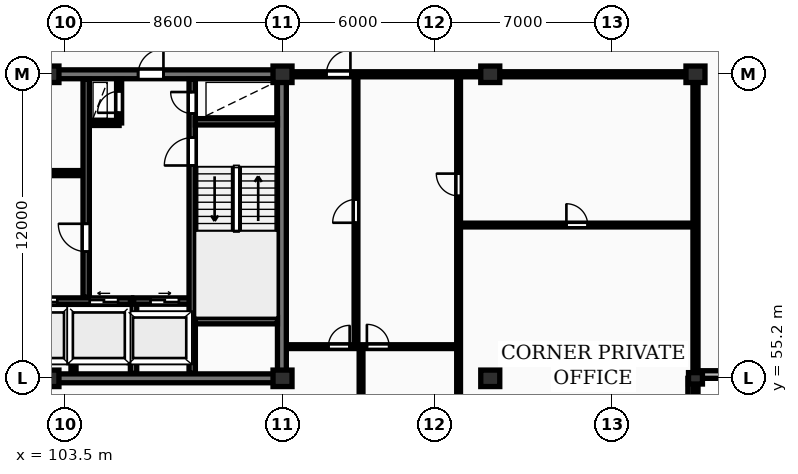
"""IFC4 building model, lengths in metres.
Left out: names, types, materials, properties, quantities, classifications, styles, units other than length and angle.
Written with IfcOpenShell. Run it as: python <this file> out.ifc"""

import sys

from ifc_helpers import new_model, si_unit, direction, frame, frame_2d, origin, origin_2d, place, context, subcontext, project, spatial, rectangle, extrude, element, fill, save


model = new_model("IFC4")
c1 = context("Model", 3, precision=1e-05, world=origin(), true_north=direction((0.0, 1.0)))
c2 = subcontext(c1, "Body", "Model", "MODEL_VIEW")
j1 = project(units=[si_unit("LENGTHUNIT", "METRE"), si_unit("PLANEANGLEUNIT", "RADIAN")], contexts=[c1])
p1 = place(None, origin())
s1 = spatial("IfcSite", under=j1, at=p1, CompositionType="ELEMENT")
p2 = place(p1, origin())
s2 = spatial("IfcBuilding", under=s1, at=p2, CompositionType="ELEMENT")
p3 = place(p2, frame((0.0, 0.0, 228.65)))
s3 = spatial("IfcBuildingStorey", under=s2, at=p3, CompositionType="ELEMENT", Elevation=228.65)
for number, where, z_axis, x_axis in (
    (1, (102.9, 55.2, 0.0), (0.0, 0.0, 1.0), (1.0, 0.0, 0.0)),
    (2, (102.9, 67.2, 0.0), (0.0, 0.0, 1.0), (1.0, 0.0, 0.0)),
    (3, (112.1, 55.2, 0.0), (0.0, 0.0, 1.0), (1.0, 0.0, 0.0)),
    (4, (112.1, 67.2, 0.0), (0.0, 0.0, 1.0), (1.0, 0.0, 0.0)),
    (5, (120.3, 55.2, 0.0), (0.0, 0.0, 1.0), (1.0, 0.0, 0.0)),
    (6, (120.3, 67.2, 0.0), (0.0, 0.0, 1.0), (1.0, 0.0, 0.0)),
):
    element("IfcColumn", number, at=place(p3, frame(where, z_axis=z_axis, x_axis=x_axis)), inside=s3, PredefinedType="COLUMN", context=c2, shape_type="SweptSolid", body=[
        extrude(rectangle(XDim=0.75, YDim=0.65, at=origin_2d()), origin(), (0.0, 0.0, 1.0), 3.45),
    ])
p4 = place(p3, frame((128.4, 55.2, 0.0), z_axis=(0.0, 0.0, 1.0), x_axis=(1.0, 0.0, 0.0)))
e7 = element("IfcColumn", 7, at=p4, inside=s3, PredefinedType="PILASTER", context=c2, shape_type="SweptSolid", body=[
    extrude(rectangle(XDim=0.55, YDim=0.45, at=origin_2d()), origin(), (0.0, 0.0, 1.0), 3.45),
])
p5 = place(p3, frame((128.4, 67.2, 0.0), z_axis=(0.0, 0.0, 1.0), x_axis=(1.0, 0.0, 0.0)))
e8 = element("IfcColumn", 8, at=p5, inside=s3, PredefinedType="COLUMN", context=c2, shape_type="SweptSolid", body=[
    extrude(rectangle(XDim=0.75, YDim=0.65, at=origin_2d()), origin(), (0.0, 0.0, 1.0), 3.45),
])
p6 = place(p3, frame((128.25, 51.6, 0.0), z_axis=(0.0, 0.0, 1.0), x_axis=(0.0, 1.0, 0.0)))
e9 = element("IfcWall", 9, at=p6, inside=s3, PredefinedType="STANDARD", context=c2, shape_type="SweptSolid", body=[
    extrude(rectangle(XDim=3.6, YDim=0.3, at=frame_2d((1.8, 0.0))), origin(), (0.0, 0.0, 1.0), 3.17),
])
p7 = place(p3, frame((128.4, 55.35, 0.0), z_axis=(0.0, 0.0, 1.0), x_axis=(1.0, 0.0, 0.0)))
e10 = element("IfcWall", 10, at=p7, inside=s3, PredefinedType="STANDARD", context=c2, shape_type="SweptSolid", body=[
    extrude(rectangle(XDim=3.6, YDim=0.3, at=frame_2d((1.8, 0.0))), origin(), (0.0, 0.0, 1.0), 3.17),
])
p8 = place(p3, frame((75.95, 55.2, 0.0), z_axis=(0.0, 0.0, 1.0), x_axis=(1.0, 0.0, 0.0)))
e11 = element("IfcWall", 11, at=p8, inside=s3, PredefinedType="SHEAR", context=c2, shape_type="SweptSolid", body=[
    extrude(rectangle(XDim=36.3, YDim=0.35, at=frame_2d((18.15, 0.0))), origin(), (0.0, 0.0, 1.0), 3.45),
])
p9 = place(p3, frame((112.075, 55.375, 0.0), z_axis=(0.0, 0.0, 1.0), x_axis=(0.0, 1.0, 0.0)))
e12 = element("IfcWall", 12, at=p9, inside=s3, PredefinedType="SHEAR", context=c2, shape_type="SweptSolid", body=[
    extrude(rectangle(XDim=11.65, YDim=0.35, at=frame_2d((5.825, 0.0))), origin(), (0.0, 0.0, 1.0), 3.45),
])
p10 = place(p3, frame((75.95, 67.2, 0.0), z_axis=(0.0, 0.0, 1.0), x_axis=(1.0, 0.0, 0.0)))
e13 = element("IfcWall", 13, at=p10, inside=s3, PredefinedType="SHEAR", context=c2, shape_type="SweptSolid", body=[
    extrude(rectangle(XDim=36.3, YDim=0.35, at=frame_2d((18.15, 0.0))), origin(), (0.0, 0.0, 1.0), 3.45),
])
p11 = place(p10, frame((5.25, 0.0, 0.0)))
e14 = element("IfcOpeningElement", 14, at=p11, cuts=e13, PredefinedType="OPENING", context=c2, shape_type="SweptSolid", body=[
    extrude(rectangle(XDim=1.0, YDim=2.15, at=frame_2d((0.5, 1.075))), frame((0.0, 0.185, 0.0), z_axis=(0.0, -1.0, 0.0), x_axis=(1.0, 0.0, 0.0)), (0.0, 0.0, 1.0), 0.37),
])
p12 = place(p10, frame((21.6, 0.0, 0.0)))
e15 = element("IfcOpeningElement", 15, at=p12, cuts=e13, PredefinedType="OPENING", context=c2, shape_type="SweptSolid", body=[
    extrude(rectangle(XDim=1.5, YDim=2.2, at=frame_2d((0.75, 1.1))), frame((0.0, 0.185, 0.0), z_axis=(0.0, -1.0, 0.0), x_axis=(1.0, 0.0, 0.0)), (0.0, 0.0, 1.0), 0.37),
])
p13 = place(p10, frame((30.45, 0.0, 0.0)))
e16 = element("IfcOpeningElement", 16, at=p13, cuts=e13, PredefinedType="OPENING", context=c2, shape_type="SweptSolid", body=[
    extrude(rectangle(XDim=1.0, YDim=2.15, at=frame_2d((0.5, 1.075))), frame((0.0, 0.185, 0.0), z_axis=(0.0, -1.0, 0.0), x_axis=(1.0, 0.0, 0.0)), (0.0, 0.0, 1.0), 0.37),
])
p14 = place(p3, frame((103.85, 55.4, 0.0), z_axis=(0.0, 0.0, 1.0), x_axis=(0.0, 1.0, 0.0)))
e17 = element("IfcWall", 17, at=p14, inside=s3, PredefinedType="PARTITIONING", context=c2, shape_type="SweptSolid", body=[
    extrude(rectangle(XDim=2.72, YDim=0.2, at=frame_2d((1.36, 0.0))), origin(), (0.0, 0.0, 1.0), 3.17),
])
p15 = place(p3, frame((101.55, 58.25, 0.0), z_axis=(0.0, 0.0, 1.0), x_axis=(1.0, 0.0, 0.0)))
e18 = element("IfcWall", 18, at=p15, inside=s3, PredefinedType="SHEAR", context=c2, shape_type="SweptSolid", body=[
    extrude(rectangle(XDim=4.6, YDim=0.25, at=frame_2d((2.3, 0.0))), origin(), (0.0, 0.0, 1.0), 3.45),
])
p16 = place(p15, frame((0.54, 0.0, 0.0)))
e19 = element("IfcOpeningElement", 19, at=p16, cuts=e18, PredefinedType="OPENING", context=c2, shape_type="SweptSolid", body=[
    extrude(rectangle(XDim=1.12, YDim=2.12, at=frame_2d((0.56, 1.06))), frame((0.0, 0.135, 0.0), z_axis=(0.0, -1.0, 0.0), x_axis=(1.0, 0.0, 0.0)), (0.0, 0.0, 1.0), 0.27),
])
p17 = place(p15, frame((2.94, 0.0, 0.0)))
e20 = element("IfcOpeningElement", 20, at=p17, cuts=e18, PredefinedType="OPENING", context=c2, shape_type="SweptSolid", body=[
    extrude(rectangle(XDim=1.12, YDim=2.12, at=frame_2d((0.56, 1.06))), frame((0.0, 0.135, 0.0), z_axis=(0.0, -1.0, 0.0), x_axis=(1.0, 0.0, 0.0)), (0.0, 0.0, 1.0), 0.27),
])
p18 = place(p3, frame((106.22, 55.4, 0.0), z_axis=(0.0, 0.0, 1.0), x_axis=(0.0, 1.0, 0.0)))
e21 = element("IfcWall", 21, at=p18, inside=s3, PredefinedType="SHEAR", context=c2, shape_type="SweptSolid", body=[
    extrude(rectangle(XDim=2.85, YDim=0.25, at=frame_2d((1.425, 0.0))), origin(), (0.0, 0.0, 1.0), 3.45),
])
p19 = place(p3, frame((106.22, 58.25, 0.0), z_axis=(0.0, 0.0, 1.0), x_axis=(1.0, 0.0, 0.0)))
e22 = element("IfcWall", 22, at=p19, inside=s3, PredefinedType="SHEAR", context=c2, shape_type="SweptSolid", body=[
    extrude(rectangle(XDim=2.46, YDim=0.25, at=frame_2d((1.23, 0.0))), origin(), (0.0, 0.0, 1.0), 3.45),
])
p20 = place(p19, frame((0.67, 0.0, 0.0)))
e23 = element("IfcOpeningElement", 23, at=p20, cuts=e22, PredefinedType="OPENING", context=c2, shape_type="SweptSolid", body=[
    extrude(rectangle(XDim=1.12, YDim=2.12, at=frame_2d((0.56, 1.06))), frame((0.0, 0.135, 0.0), z_axis=(0.0, -1.0, 0.0), x_axis=(1.0, 0.0, 0.0)), (0.0, 0.0, 1.0), 0.27),
])
p21 = place(p3, frame((84.42, 63.3, 0.0), z_axis=(0.0, 0.0, 1.0), x_axis=(1.0, 0.0, 0.0)))
e24 = element("IfcWall", 24, at=p21, inside=s3, PredefinedType="PARTITIONING", context=c2, shape_type="SweptSolid", body=[
    extrude(rectangle(XDim=19.83, YDim=0.2, at=frame_2d((9.915, 0.0))), origin(), (0.0, 0.0, 1.0), 3.17),
])
p22 = place(p21, frame((1.15, 0.0, 0.0)))
e25 = element("IfcOpeningElement", 25, at=p22, cuts=e24, PredefinedType="OPENING", context=c2, shape_type="SweptSolid", body=[
    extrude(rectangle(XDim=0.85, YDim=2.05, at=frame_2d((0.425, 1.025))), frame((0.0, 0.11, 0.0), z_axis=(0.0, -1.0, 0.0), x_axis=(1.0, 0.0, 0.0)), (0.0, 0.0, 1.0), 0.22),
])
p23 = place(p21, frame((3.25, 0.0, 0.0)))
e26 = element("IfcOpeningElement", 26, at=p23, cuts=e24, PredefinedType="OPENING", context=c2, shape_type="SweptSolid", body=[
    extrude(rectangle(XDim=0.85, YDim=2.05, at=frame_2d((0.425, 1.025))), frame((0.0, 0.11, 0.0), z_axis=(0.0, -1.0, 0.0), x_axis=(1.0, 0.0, 0.0)), (0.0, 0.0, 1.0), 0.22),
])
p24 = place(p21, frame((13.08, 0.0, 0.0)))
e27 = element("IfcOpeningElement", 27, at=p24, cuts=e24, PredefinedType="OPENING", context=c2, shape_type="SweptSolid", body=[
    extrude(rectangle(XDim=1.5, YDim=2.2, at=frame_2d((0.75, 1.1))), frame((0.0, 0.11, 0.0), z_axis=(0.0, -1.0, 0.0), x_axis=(1.0, 0.0, 0.0)), (0.0, 0.0, 1.0), 0.22),
])
p25 = place(p21, frame((6.78, 0.0, 0.0)))
e28 = element("IfcOpeningElement", 28, at=p25, cuts=e24, PredefinedType="OPENING", context=c2, shape_type="SweptSolid", body=[
    extrude(rectangle(XDim=0.92, YDim=2.08, at=frame_2d((0.46, 1.04))), frame((0.0, 0.11, 0.0), z_axis=(0.0, -1.0, 0.0), x_axis=(1.0, 0.0, 0.0)), (0.0, 0.0, 1.0), 0.22),
])
p26 = place(p21, frame((16.28, 0.0, 0.0)))
e29 = element("IfcOpeningElement", 29, at=p26, cuts=e24, PredefinedType="OPENING", context=c2, shape_type="SweptSolid", body=[
    extrude(rectangle(XDim=0.92, YDim=2.08, at=frame_2d((0.46, 1.04))), frame((0.0, 0.11, 0.0), z_axis=(0.0, -1.0, 0.0), x_axis=(1.0, 0.0, 0.0)), (0.0, 0.0, 1.0), 0.22),
])
p27 = place(p3, frame((104.45, 65.28, 0.0), z_axis=(0.0, 0.0, 1.0), x_axis=(1.0, 0.0, 0.0)))
e30 = element("IfcWall", 30, at=p27, inside=s3, PredefinedType="PARTITIONING", context=c2, shape_type="SweptSolid", body=[
    extrude(rectangle(XDim=1.2, YDim=0.2, at=frame_2d((0.6, 0.0))), origin(), (0.0, 0.0, 1.0), 3.17),
])
p28 = place(p3, frame((105.65, 65.28, 0.0), z_axis=(0.0, 0.0, 1.0), x_axis=(0.0, 1.0, 0.0)))
e31 = element("IfcWall", 31, at=p28, inside=s3, PredefinedType="PARTITIONING", context=c2, shape_type="SweptSolid", body=[
    extrude(rectangle(XDim=1.72, YDim=0.2, at=frame_2d((0.86, 0.0))), origin(), (0.0, 0.0, 1.0), 3.17),
])
p29 = place(p28, frame((0.4, 0.0, 0.0)))
e32 = element("IfcOpeningElement", 32, at=p29, cuts=e31, PredefinedType="OPENING", context=c2, shape_type="SweptSolid", body=[
    extrude(rectangle(XDim=0.85, YDim=2.05, at=frame_2d((0.425, 1.025))), frame((0.0, 0.11, 0.0), z_axis=(0.0, -1.0, 0.0), x_axis=(1.0, 0.0, 0.0)), (0.0, 0.0, 1.0), 0.22),
])
p30 = place(p3, frame((104.35, 58.4, 0.0), z_axis=(0.0, 0.0, 1.0), x_axis=(0.0, 1.0, 0.0)))
e33 = element("IfcWall", 33, at=p30, inside=s3, PredefinedType="SHEAR", context=c2, shape_type="SweptSolid", body=[
    extrude(rectangle(XDim=8.6, YDim=0.25, at=frame_2d((4.3, 0.0))), origin(), (0.0, 0.0, 1.0), 3.45),
])
p31 = place(p30, frame((1.8, 0.0, 0.0)))
e34 = element("IfcOpeningElement", 34, at=p31, cuts=e33, PredefinedType="OPENING", context=c2, shape_type="SweptSolid", body=[
    extrude(rectangle(XDim=1.1, YDim=2.1, at=frame_2d((0.55, 1.05))), frame((0.0, 0.135, 0.0), z_axis=(0.0, -1.0, 0.0), x_axis=(1.0, 0.0, 0.0)), (0.0, 0.0, 1.0), 0.27),
])
p32 = place(p3, frame((108.535, 55.4, 0.0), z_axis=(0.0, 0.0, 1.0), x_axis=(0.0, 1.0, 0.0)))
e35 = element("IfcWall", 35, at=p32, inside=s3, PredefinedType="SHEAR", context=c2, shape_type="SweptSolid", body=[
    extrude(rectangle(XDim=11.6, YDim=0.25, at=frame_2d((5.8, 0.0))), origin(), (0.0, 0.0, 1.0), 3.45),
])
p33 = place(p32, frame((8.2, 0.0, 0.0)))
e36 = element("IfcOpeningElement", 36, at=p33, cuts=e35, PredefinedType="OPENING", context=c2, shape_type="SweptSolid", body=[
    extrude(rectangle(XDim=1.1, YDim=2.1, at=frame_2d((0.55, 1.05))), frame((0.0, 0.135, 0.0), z_axis=(0.0, -1.0, 0.0), x_axis=(1.0, 0.0, 0.0)), (0.0, 0.0, 1.0), 0.27),
])
p34 = place(p32, frame((10.25, 0.0, 0.0)))
e37 = element("IfcOpeningElement", 37, at=p34, cuts=e35, PredefinedType="OPENING", context=c2, shape_type="SweptSolid", body=[
    extrude(rectangle(XDim=0.85, YDim=2.05, at=frame_2d((0.425, 1.025))), frame((0.0, 0.135, 0.0), z_axis=(0.0, -1.0, 0.0), x_axis=(1.0, 0.0, 0.0)), (0.0, 0.0, 1.0), 0.27),
])
for number, where, z_axis, x_axis in (
    (38, (108.66, 57.475, 0.0), (0.0, 0.0, 1.0), (1.0, 0.0, 0.0)),
    (39, (108.66, 65.325, 0.0), (0.0, 0.0, 1.0), (1.0, 0.0, 0.0)),
):
    element("IfcWall", number, at=place(p3, frame(where, z_axis=z_axis, x_axis=x_axis)), inside=s3, PredefinedType="SHEAR", context=c2, shape_type="SweptSolid", body=[
        extrude(rectangle(XDim=3.24, YDim=0.25, at=frame_2d((1.62, 0.0))), origin(), (0.0, 0.0, 1.0), 3.45),
    ])
p35 = place(p3, frame((128.4, 51.9, 0.0), z_axis=(0.0, 0.0, 1.0), x_axis=(0.0, 1.0, 0.0)))
e40 = element("IfcWall", 40, at=p35, inside=s3, PredefinedType="PARTITIONING", context=c2, shape_type="SweptSolid", body=[
    extrude(rectangle(XDim=15.3, YDim=0.2, at=frame_2d((7.65, 0.0))), origin(), (0.0, 0.0, 1.0), 2.477),
])
p36 = place(p3, frame((119.05, 61.25, 0.0), z_axis=(0.0, 0.0, 1.0), x_axis=(1.0, 0.0, 0.0)))
e41 = element("IfcWall", 41, at=p36, inside=s3, PredefinedType="PARTITIONING", context=c2, shape_type="SweptSolid", body=[
    extrude(rectangle(XDim=9.35, YDim=0.15, at=frame_2d((4.675, 0.0))), origin(), (0.0, 0.0, 1.0), 3.17),
])
p37 = place(p36, frame((4.255, 0.0, 0.0)))
e42 = element("IfcOpeningElement", 42, at=p37, cuts=e41, PredefinedType="OPENING", context=c2, shape_type="SweptSolid", body=[
    extrude(rectangle(XDim=0.84, YDim=2.04, at=frame_2d((0.42, 1.02))), frame((0.0, 0.085, 0.0), z_axis=(0.0, -1.0, 0.0), x_axis=(1.0, 0.0, 0.0)), (0.0, 0.0, 1.0), 0.17),
])
p38 = place(p3, frame((119.05, 51.9, 0.0), z_axis=(0.0, 0.0, 1.0), x_axis=(0.0, 1.0, 0.0)))
e43 = element("IfcWall", 43, at=p38, inside=s3, PredefinedType="PARTITIONING", context=c2, shape_type="SweptSolid", body=[
    extrude(rectangle(XDim=15.25, YDim=0.15, at=frame_2d((7.625, 0.0))), origin(), (0.0, 0.0, 1.0), 3.17),
])
p39 = place(p38, frame((10.5, 0.0, 0.0)))
e44 = element("IfcOpeningElement", 44, at=p39, cuts=e43, PredefinedType="OPENING", context=c2, shape_type="SweptSolid", body=[
    extrude(rectangle(XDim=0.88, YDim=2.06, at=frame_2d((0.44, 1.03))), frame((0.0, 0.085, 0.0), z_axis=(0.0, -1.0, 0.0), x_axis=(1.0, 0.0, 0.0)), (0.0, 0.0, 1.0), 0.17),
])
p40 = place(p3, frame((115.0, 56.45, 0.0), z_axis=(0.0, 0.0, 1.0), x_axis=(0.0, 1.0, 0.0)))
e45 = element("IfcWall", 45, at=p40, inside=s3, PredefinedType="PARTITIONING", context=c2, shape_type="SweptSolid", body=[
    extrude(rectangle(XDim=10.7, YDim=0.15, at=frame_2d((5.35, 0.0))), origin(), (0.0, 0.0, 1.0), 3.17),
])
p41 = place(p40, frame((4.89, 0.0, 0.0)))
e46 = element("IfcOpeningElement", 46, at=p41, cuts=e45, PredefinedType="OPENING", context=c2, shape_type="SweptSolid", body=[
    extrude(rectangle(XDim=0.92, YDim=2.08, at=frame_2d((0.46, 1.04))), frame((0.0, 0.085, 0.0), z_axis=(0.0, -1.0, 0.0), x_axis=(1.0, 0.0, 0.0)), (0.0, 0.0, 1.0), 0.17),
])
p42 = place(p3, frame((115.2, 51.9, 0.0), z_axis=(0.0, 0.0, 1.0), x_axis=(0.0, 1.0, 0.0)))
e47 = element("IfcWall", 47, at=p42, inside=s3, PredefinedType="PARTITIONING", context=c2, shape_type="SweptSolid", body=[
    extrude(rectangle(XDim=4.55, YDim=0.15, at=frame_2d((2.275, 0.0))), origin(), (0.0, 0.0, 1.0), 3.17),
])
p43 = place(p3, frame((112.27, 56.45, 0.0), z_axis=(0.0, 0.0, 1.0), x_axis=(1.0, 0.0, 0.0)))
e48 = element("IfcWall", 48, at=p43, inside=s3, PredefinedType="PARTITIONING", context=c2, shape_type="SweptSolid", body=[
    extrude(rectangle(XDim=6.76, YDim=0.15, at=frame_2d((3.38, 0.0))), origin(), (0.0, 0.0, 1.0), 3.17),
])
p44 = place(p43, frame((1.64, 0.0, 0.0)))
e49 = element("IfcOpeningElement", 49, at=p44, cuts=e48, PredefinedType="OPENING", context=c2, shape_type="SweptSolid", body=[
    extrude(rectangle(XDim=0.84, YDim=2.04, at=frame_2d((0.42, 1.02))), frame((0.0, 0.085, 0.0), z_axis=(0.0, -1.0, 0.0), x_axis=(1.0, 0.0, 0.0)), (0.0, 0.0, 1.0), 0.17),
])
p45 = place(p43, frame((3.16, 0.0, 0.0)))
e50 = element("IfcOpeningElement", 50, at=p45, cuts=e48, PredefinedType="OPENING", context=c2, shape_type="SweptSolid", body=[
    extrude(rectangle(XDim=0.88, YDim=2.06, at=frame_2d((0.44, 1.03))), frame((0.0, 0.085, 0.0), z_axis=(0.0, -1.0, 0.0), x_axis=(1.0, 0.0, 0.0)), (0.0, 0.0, 1.0), 0.17),
])
p46 = place(p3, frame((112.25, 67.2, 0.0), z_axis=(0.0, 0.0, 1.0), x_axis=(1.0, 0.0, 0.0)))
e51 = element("IfcWall", 51, at=p46, inside=s3, PredefinedType="PARTITIONING", context=c2, shape_type="SweptSolid", body=[
    extrude(rectangle(XDim=16.15, YDim=0.2, at=frame_2d((8.075, 0.0))), origin(), (0.0, 0.0, 1.0), 2.633),
])
p47 = place(p46, frame((1.58, 0.0, 0.0)))
e52 = element("IfcOpeningElement", 52, at=p47, cuts=e51, PredefinedType="OPENING", context=c2, shape_type="SweptSolid", body=[
    extrude(rectangle(XDim=0.95, YDim=2.15, at=frame_2d((0.475, 1.075))), frame((0.0, 0.11, 0.0), z_axis=(0.0, -1.0, 0.0), x_axis=(1.0, 0.0, 0.0)), (0.0, 0.0, 1.0), 0.22),
])
p48 = place(p13, origin())
e53 = element("IfcDoor", 53, at=p48, inside=s3, OperationType="SINGLE_SWING_RIGHT", PredefinedType="DOOR", context=c2, shape_type="SweptSolid", body=[
    extrude(rectangle(XDim=1.0, YDim=2.15, at=frame_2d((0.5, 1.075))), frame((0.0, 0.025, 0.0), z_axis=(0.0, -1.0, 0.0), x_axis=(1.0, 0.0, 0.0)), (0.0, 0.0, 1.0), 0.05),
])
fill(e16, e53)
p49 = place(p16, origin())
e54 = element("IfcDoor", 54, at=p49, inside=s3, OperationType="SLIDING_TO_LEFT", PredefinedType="DOOR", context=c2, shape_type="SweptSolid", body=[
    extrude(rectangle(XDim=1.12, YDim=2.12, at=frame_2d((0.56, 1.06))), frame((0.0, 0.025, 0.0), z_axis=(0.0, -1.0, 0.0), x_axis=(1.0, 0.0, 0.0)), (0.0, 0.0, 1.0), 0.05),
])
fill(e19, e54)
p50 = place(p17, origin())
e55 = element("IfcDoor", 55, at=p50, inside=s3, OperationType="SLIDING_TO_LEFT", PredefinedType="DOOR", context=c2, shape_type="SweptSolid", body=[
    extrude(rectangle(XDim=1.12, YDim=2.12, at=frame_2d((0.56, 1.06))), frame((0.0, 0.025, 0.0), z_axis=(0.0, -1.0, 0.0), x_axis=(1.0, 0.0, 0.0)), (0.0, 0.0, 1.0), 0.05),
])
fill(e20, e55)
p51 = place(p20, origin())
e56 = element("IfcDoor", 56, at=p51, inside=s3, OperationType="SLIDING_TO_RIGHT", PredefinedType="DOOR", context=c2, shape_type="SweptSolid", body=[
    extrude(rectangle(XDim=1.12, YDim=2.12, at=frame_2d((0.56, 1.06))), frame((0.0, 0.025, 0.0), z_axis=(0.0, -1.0, 0.0), x_axis=(1.0, 0.0, 0.0)), (0.0, 0.0, 1.0), 0.05),
])
fill(e23, e56)
p52 = place(p29, origin())
e57 = element("IfcDoor", 57, at=p52, inside=s3, OperationType="SINGLE_SWING_LEFT", PredefinedType="DOOR", context=c2, shape_type="SweptSolid", body=[
    extrude(rectangle(XDim=0.85, YDim=2.05, at=frame_2d((0.425, 1.025))), frame((0.0, 0.025, 0.0), z_axis=(0.0, -1.0, 0.0), x_axis=(1.0, 0.0, 0.0)), (0.0, 0.0, 1.0), 0.05),
])
fill(e32, e57)
p53 = place(p31, origin())
e58 = element("IfcDoor", 58, at=p53, inside=s3, OperationType="SINGLE_SWING_RIGHT", PredefinedType="DOOR", context=c2, shape_type="SweptSolid", body=[
    extrude(rectangle(XDim=1.1, YDim=2.1, at=frame_2d((0.55, 1.05))), frame((0.0, 0.025, 0.0), z_axis=(0.0, -1.0, 0.0), x_axis=(1.0, 0.0, 0.0)), (0.0, 0.0, 1.0), 0.05),
])
fill(e34, e58)
p54 = place(p33, origin())
e59 = element("IfcDoor", 59, at=p54, inside=s3, OperationType="SINGLE_SWING_LEFT", PredefinedType="DOOR", context=c2, shape_type="SweptSolid", body=[
    extrude(rectangle(XDim=1.1, YDim=2.1, at=frame_2d((0.55, 1.05))), frame((0.0, 0.025, 0.0), z_axis=(0.0, -1.0, 0.0), x_axis=(1.0, 0.0, 0.0)), (0.0, 0.0, 1.0), 0.05),
])
fill(e36, e59)
p55 = place(p34, origin())
e60 = element("IfcDoor", 60, at=p55, inside=s3, OperationType="SINGLE_SWING_RIGHT", PredefinedType="DOOR", context=c2, shape_type="SweptSolid", body=[
    extrude(rectangle(XDim=0.85, YDim=2.05, at=frame_2d((0.425, 1.025))), frame((0.0, 0.025, 0.0), z_axis=(0.0, -1.0, 0.0), x_axis=(1.0, 0.0, 0.0)), (0.0, 0.0, 1.0), 0.05),
])
fill(e37, e60)
p56 = place(p37, origin())
e61 = element("IfcDoor", 61, at=p56, inside=s3, OperationType="SINGLE_SWING_LEFT", PredefinedType="DOOR", context=c2, shape_type="SweptSolid", body=[
    extrude(rectangle(XDim=0.84, YDim=2.04, at=frame_2d((0.42, 1.02))), frame((0.0, 0.025, 0.0), z_axis=(0.0, -1.0, 0.0), x_axis=(1.0, 0.0, 0.0)), (0.0, 0.0, 1.0), 0.05),
])
fill(e42, e61)
p57 = place(p39, origin())
e62 = element("IfcDoor", 62, at=p57, inside=s3, OperationType="SINGLE_SWING_RIGHT", PredefinedType="DOOR", context=c2, shape_type="SweptSolid", body=[
    extrude(rectangle(XDim=0.88, YDim=2.06, at=frame_2d((0.44, 1.03))), frame((0.0, 0.025, 0.0), z_axis=(0.0, -1.0, 0.0), x_axis=(1.0, 0.0, 0.0)), (0.0, 0.0, 1.0), 0.05),
])
fill(e44, e62)
p58 = place(p41, origin())
e63 = element("IfcDoor", 63, at=p58, inside=s3, OperationType="SINGLE_SWING_LEFT", PredefinedType="DOOR", context=c2, shape_type="SweptSolid", body=[
    extrude(rectangle(XDim=0.92, YDim=2.08, at=frame_2d((0.46, 1.04))), frame((0.0, 0.025, 0.0), z_axis=(0.0, -1.0, 0.0), x_axis=(1.0, 0.0, 0.0)), (0.0, 0.0, 1.0), 0.05),
])
fill(e46, e63)
p59 = place(p44, origin())
e64 = element("IfcDoor", 64, at=p59, inside=s3, OperationType="SINGLE_SWING_RIGHT", PredefinedType="DOOR", context=c2, shape_type="SweptSolid", body=[
    extrude(rectangle(XDim=0.84, YDim=2.04, at=frame_2d((0.42, 1.02))), frame((0.0, 0.025, 0.0), z_axis=(0.0, -1.0, 0.0), x_axis=(1.0, 0.0, 0.0)), (0.0, 0.0, 1.0), 0.05),
])
fill(e49, e64)
p60 = place(p45, origin())
e65 = element("IfcDoor", 65, at=p60, inside=s3, OperationType="SINGLE_SWING_LEFT", PredefinedType="DOOR", context=c2, shape_type="SweptSolid", body=[
    extrude(rectangle(XDim=0.88, YDim=2.06, at=frame_2d((0.44, 1.03))), frame((0.0, 0.025, 0.0), z_axis=(0.0, -1.0, 0.0), x_axis=(1.0, 0.0, 0.0)), (0.0, 0.0, 1.0), 0.05),
])
fill(e50, e65)
p61 = place(p47, origin())
e66 = element("IfcDoor", 66, at=p61, inside=s3, OperationType="SINGLE_SWING_RIGHT", PredefinedType="DOOR", context=c2, shape_type="SweptSolid", body=[
    extrude(rectangle(XDim=0.95, YDim=2.15, at=frame_2d((0.475, 1.075))), frame((0.0, 0.025, 0.0), z_axis=(0.0, -1.0, 0.0), x_axis=(1.0, 0.0, 0.0)), (0.0, 0.0, 1.0), 0.05),
])
fill(e52, e66)
save(model, sys.argv[1])
